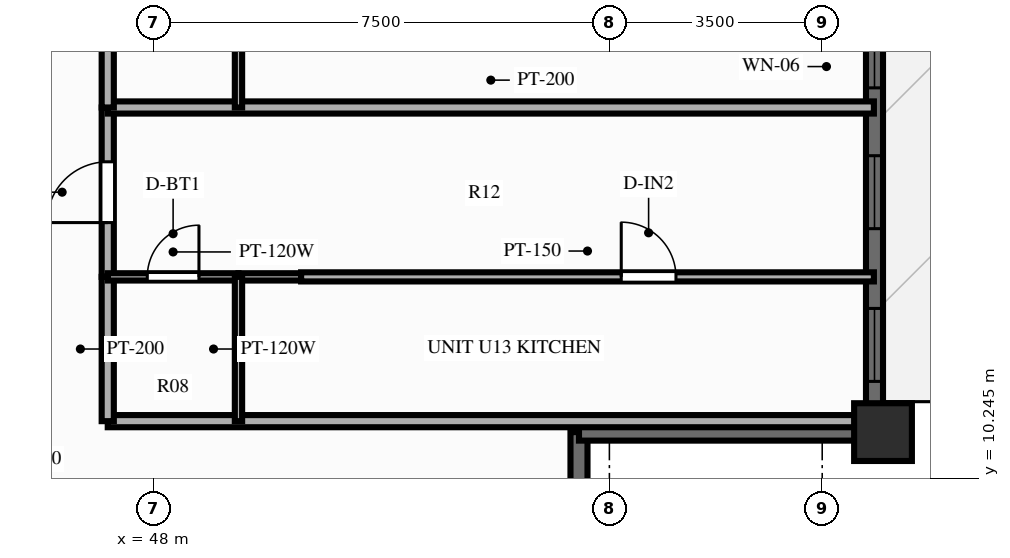
"""IFC4 building model, lengths in metres.
Left out: names, types, materials, properties, quantities, classifications, styles, units other than length and angle.
Written with IfcOpenShell. Run it as: python <this file> out.ifc"""

import sys

from ifc_helpers import new_model, si_unit, direction, frame, frame_2d, origin, origin_2d, place, context, subcontext, project, spatial, rectangle, extrude, source, transform, mapped, element, fill, save


model = new_model("IFC4")
c1 = context("Model", 3, precision=1e-05, world=origin(), true_north=direction((0.0, 1.0)))
c2 = subcontext(c1, "Body", "Model", "MODEL_VIEW")
j1 = project(units=[si_unit("LENGTHUNIT", "METRE"), si_unit("PLANEANGLEUNIT", "RADIAN")], contexts=[c1])
p1 = place(None, origin())
s1 = spatial("IfcSite", under=j1, at=p1, CompositionType="ELEMENT")
p2 = place(p1, origin())
s2 = spatial("IfcBuilding", under=s1, at=p2, CompositionType="ELEMENT")
p3 = place(p2, frame((0.0, 0.0, 169.0)))
s3 = spatial("IfcBuildingStorey", under=s2, at=p3, CompositionType="ELEMENT", Elevation=169.0)
m1 = source(origin(), c2, "Body", "SweptSolid", [
    extrude(rectangle(XDim=0.95, YDim=0.95, at=origin_2d()), origin(), (0.0, 0.0, 1.0), 3.9),
])
p4 = place(p3, frame((60.0, 11.0, 0.0), z_axis=(0.0, 0.0, 1.0), x_axis=(1.0, 0.0, 0.0)))
e1 = element("IfcColumn", 1, at=p4, inside=s3, PredefinedType="COLUMN", context=c2, shape_type="MappedRepresentation", body=[
    mapped(m1, transform((0.0, 0.0, 0.0), scale=1.0)),
])
p5 = place(p3, frame((59.86, 11.0, 0.0), z_axis=(0.0, 0.0, 1.0), x_axis=(0.0, 1.0, 0.0)))
e2 = element("IfcWall", 2, at=p5, inside=s3, PredefinedType="SOLIDWALL", context=c2, shape_type="SweptSolid", body=[
    extrude(rectangle(XDim=32.0, YDim=0.28, at=frame_2d((16.0, 0.0))), origin(), (0.0, 0.0, 1.0), 2.44),
])
p6 = place(p5, frame((0.834, 0.0, 0.25)))
e3 = element("IfcOpeningElement", 3, at=p6, cuts=e2, PredefinedType="OPENING", context=c2, shape_type="SweptSolid", body=[
    extrude(rectangle(XDim=1.2, YDim=1.5, at=frame_2d((0.6, 0.75))), frame((0.0, 0.152, 0.0), z_axis=(0.0, -1.0, 0.0), x_axis=(1.0, 0.0, 0.0)), (0.0, 0.0, 1.0), 0.304),
])
p7 = place(p5, frame((3.346, 0.0, 0.25)))
e4 = element("IfcOpeningElement", 4, at=p7, cuts=e2, PredefinedType="OPENING", context=c2, shape_type="SweptSolid", body=[
    extrude(rectangle(XDim=1.2, YDim=1.5, at=frame_2d((0.6, 0.75))), frame((0.0, 0.152, 0.0), z_axis=(0.0, -1.0, 0.0), x_axis=(1.0, 0.0, 0.0)), (0.0, 0.0, 1.0), 0.304),
])
p8 = place(p5, frame((5.662, 0.0, 0.25)))
e5 = element("IfcOpeningElement", 5, at=p8, cuts=e2, PredefinedType="OPENING", context=c2, shape_type="SweptSolid", body=[
    extrude(rectangle(XDim=0.7, YDim=1.5, at=frame_2d((0.35, 0.75))), frame((0.0, 0.152, 0.0), z_axis=(0.0, -1.0, 0.0), x_axis=(1.0, 0.0, 0.0)), (0.0, 0.0, 1.0), 0.304),
])
p9 = place(p5, frame((8.29, 0.0, 0.25)))
e6 = element("IfcOpeningElement", 6, at=p9, cuts=e2, PredefinedType="OPENING", context=c2, shape_type="SweptSolid", body=[
    extrude(rectangle(XDim=1.2, YDim=1.5, at=frame_2d((0.6, 0.75))), frame((0.0, 0.152, 0.0), z_axis=(0.0, -1.0, 0.0), x_axis=(1.0, 0.0, 0.0)), (0.0, 0.0, 1.0), 0.304),
])
p10 = place(p5, frame((10.688, 0.0, 0.25)))
e7 = element("IfcOpeningElement", 7, at=p10, cuts=e2, PredefinedType="OPENING", context=c2, shape_type="SweptSolid", body=[
    extrude(rectangle(XDim=1.2, YDim=1.5, at=frame_2d((0.6, 0.75))), frame((0.0, 0.152, 0.0), z_axis=(0.0, -1.0, 0.0), x_axis=(1.0, 0.0, 0.0)), (0.0, 0.0, 1.0), 0.304),
])
p11 = place(p5, frame((13.046, 0.0, 0.25)))
e8 = element("IfcOpeningElement", 8, at=p11, cuts=e2, PredefinedType="OPENING", context=c2, shape_type="SweptSolid", body=[
    extrude(rectangle(XDim=1.2, YDim=1.5, at=frame_2d((0.6, 0.75))), frame((0.0, 0.152, 0.0), z_axis=(0.0, -1.0, 0.0), x_axis=(1.0, 0.0, 0.0)), (0.0, 0.0, 1.0), 0.304),
])
p12 = place(p5, frame((15.4, 0.0, 0.25)))
e9 = element("IfcOpeningElement", 9, at=p12, cuts=e2, PredefinedType="OPENING", context=c2, shape_type="SweptSolid", body=[
    extrude(rectangle(XDim=1.2, YDim=1.5, at=frame_2d((0.6, 0.75))), frame((0.0, 0.152, 0.0), z_axis=(0.0, -1.0, 0.0), x_axis=(1.0, 0.0, 0.0)), (0.0, 0.0, 1.0), 0.304),
])
p13 = place(p5, frame((19.233, 0.0, 0.0), z_axis=(0.0, 0.0, 1.0), x_axis=(-1.0, 0.0, 0.0)))
e10 = element("IfcOpeningElement", 10, at=p13, cuts=e2, PredefinedType="OPENING", context=c2, shape_type="SweptSolid", body=[
    extrude(rectangle(XDim=1.6, YDim=2.15, at=frame_2d((0.8, 1.075))), frame((0.0, 0.152, 0.0), z_axis=(0.0, -1.0, 0.0), x_axis=(1.0, 0.0, 0.0)), (0.0, 0.0, 1.0), 0.304),
])
p14 = place(p5, frame((20.339, 0.0, 0.25)))
e11 = element("IfcOpeningElement", 11, at=p14, cuts=e2, PredefinedType="OPENING", context=c2, shape_type="SweptSolid", body=[
    extrude(rectangle(XDim=1.2, YDim=1.5, at=frame_2d((0.6, 0.75))), frame((0.0, 0.152, 0.0), z_axis=(0.0, -1.0, 0.0), x_axis=(1.0, 0.0, 0.0)), (0.0, 0.0, 1.0), 0.304),
])
p15 = place(p5, frame((22.788, 0.0, 0.25)))
e12 = element("IfcOpeningElement", 12, at=p15, cuts=e2, PredefinedType="OPENING", context=c2, shape_type="SweptSolid", body=[
    extrude(rectangle(XDim=1.2, YDim=1.5, at=frame_2d((0.6, 0.75))), frame((0.0, 0.152, 0.0), z_axis=(0.0, -1.0, 0.0), x_axis=(1.0, 0.0, 0.0)), (0.0, 0.0, 1.0), 0.304),
])
p16 = place(p5, frame((25.66, 0.0, 0.25)))
e13 = element("IfcOpeningElement", 13, at=p16, cuts=e2, PredefinedType="OPENING", context=c2, shape_type="SweptSolid", body=[
    extrude(rectangle(XDim=0.95, YDim=1.5, at=frame_2d((0.475, 0.75))), frame((0.0, 0.152, 0.0), z_axis=(0.0, -1.0, 0.0), x_axis=(1.0, 0.0, 0.0)), (0.0, 0.0, 1.0), 0.304),
])
p17 = place(p5, frame((27.669, 0.0, 0.25)))
e14 = element("IfcOpeningElement", 14, at=p17, cuts=e2, PredefinedType="OPENING", context=c2, shape_type="SweptSolid", body=[
    extrude(rectangle(XDim=1.2, YDim=1.5, at=frame_2d((0.6, 0.75))), frame((0.0, 0.152, 0.0), z_axis=(0.0, -1.0, 0.0), x_axis=(1.0, 0.0, 0.0)), (0.0, 0.0, 1.0), 0.304),
])
p18 = place(p5, frame((30.034, 0.0, 0.25)))
e15 = element("IfcOpeningElement", 15, at=p18, cuts=e2, PredefinedType="OPENING", context=c2, shape_type="SweptSolid", body=[
    extrude(rectangle(XDim=1.2, YDim=1.5, at=frame_2d((0.6, 0.75))), frame((0.0, 0.152, 0.0), z_axis=(0.0, -1.0, 0.0), x_axis=(1.0, 0.0, 0.0)), (0.0, 0.0, 1.0), 0.304),
])
for number, where, z_axis, x_axis in (
    (16, (55.0, 6.08, 0.0), (0.0, 0.0, 1.0), (0.0, 1.0, 0.0)),
    (17, (55.0, 11.0, 0.0), (0.0, 0.0, 1.0), (1.0, 0.0, 0.0)),
):
    element("IfcWall", number, at=place(p3, frame(where, z_axis=z_axis, x_axis=x_axis)), inside=s3, PredefinedType="SOLIDWALL", context=c2, shape_type="SweptSolid", body=[
        extrude(rectangle(XDim=4.92, YDim=0.28, at=frame_2d((2.46, 0.0))), origin(), (0.0, 0.0, 1.0), 2.44),
    ])
p19 = place(p3, frame((47.25, 11.18, 0.0), z_axis=(0.0, 0.0, 1.0), x_axis=(1.0, 0.0, 0.0)))
e18 = element("IfcWall", 18, at=p19, inside=s3, PredefinedType="PARTITIONING", context=c2, shape_type="SweptSolid", body=[
    extrude(rectangle(XDim=12.6, YDim=0.2, at=frame_2d((6.3, 0.0))), origin(), (0.0, 0.0, 1.0), 2.24),
])
p20 = place(p3, frame((47.25, 11.18, 0.0), z_axis=(0.0, 0.0, 1.0), x_axis=(0.0, 1.0, 0.0)))
e19 = element("IfcWall", 19, at=p20, inside=s3, PredefinedType="PARTITIONING", context=c2, shape_type="SweptSolid", body=[
    extrude(rectangle(XDim=2.373, YDim=0.2, at=frame_2d((1.187, 0.0))), origin(), (0.0, 0.0, 1.0), 3.56),
])
p21 = place(p3, frame((47.25, 13.553, 0.0), z_axis=(0.0, 0.0, 1.0), x_axis=(0.0, 1.0, 0.0)))
e20 = element("IfcWall", 20, at=p21, inside=s3, PredefinedType="PARTITIONING", context=c2, shape_type="SweptSolid", body=[
    extrude(rectangle(XDim=2.786, YDim=0.2, at=frame_2d((1.393, 0.0))), origin(), (0.0, 0.0, 1.0), 3.56),
])
p22 = place(p21, frame((0.893, 0.0, 0.0)))
e21 = element("IfcOpeningElement", 21, at=p22, cuts=e20, PredefinedType="OPENING", context=c2, shape_type="SweptSolid", body=[
    extrude(rectangle(XDim=1.0, YDim=2.15, at=frame_2d((0.5, 1.075))), frame((0.0, 0.112, 0.0), z_axis=(0.0, -1.0, 0.0), x_axis=(1.0, 0.0, 0.0)), (0.0, 0.0, 1.0), 0.224),
])
p23 = place(p3, frame((47.25, 13.553, 0.0), z_axis=(0.0, 0.0, 1.0), x_axis=(1.0, 0.0, 0.0)))
e22 = element("IfcWall", 22, at=p23, inside=s3, PredefinedType="PARTITIONING", context=c2, shape_type="SweptSolid", body=[
    extrude(rectangle(XDim=2.15, YDim=0.12, at=frame_2d((1.075, 0.0))), origin(), (0.0, 0.0, 1.0), 3.56),
])
p24 = place(p23, frame((0.65, 0.0, 0.0)))
e23 = element("IfcOpeningElement", 23, at=p24, cuts=e22, PredefinedType="OPENING", context=c2, shape_type="SweptSolid", body=[
    extrude(rectangle(XDim=0.85, YDim=2.05, at=frame_2d((0.425, 1.025))), frame((0.0, 0.072, 0.0), z_axis=(0.0, -1.0, 0.0), x_axis=(1.0, 0.0, 0.0)), (0.0, 0.0, 1.0), 0.144),
])
p25 = place(p3, frame((49.4, 13.553, 0.0), z_axis=(0.0, 0.0, 1.0), x_axis=(1.0, 0.0, 0.0)))
e24 = element("IfcWall", 24, at=p25, inside=s3, PredefinedType="PARTITIONING", context=c2, shape_type="SweptSolid", body=[
    extrude(rectangle(XDim=1.03, YDim=0.12, at=frame_2d((0.515, 0.0))), origin(), (0.0, 0.0, 1.0), 3.56),
])
p26 = place(p3, frame((49.4, 11.18, 0.0), z_axis=(0.0, 0.0, 1.0), x_axis=(0.0, 1.0, 0.0)))
e25 = element("IfcWall", 25, at=p26, inside=s3, PredefinedType="PARTITIONING", context=c2, shape_type="SweptSolid", body=[
    extrude(rectangle(XDim=2.373, YDim=0.12, at=frame_2d((1.187, 0.0))), origin(), (0.0, 0.0, 1.0), 3.56),
])
p27 = place(p3, frame((50.43, 13.553, 0.0), z_axis=(0.0, 0.0, 1.0), x_axis=(1.0, 0.0, 0.0)))
e26 = element("IfcWall", 26, at=p27, inside=s3, PredefinedType="PARTITIONING", context=c2, shape_type="SweptSolid", body=[
    extrude(rectangle(XDim=9.42, YDim=0.15, at=frame_2d((4.71, 0.0))), origin(), (0.0, 0.0, 1.0), 3.56),
])
p28 = place(p27, frame((5.265, 0.0, 0.0)))
e27 = element("IfcOpeningElement", 27, at=p28, cuts=e26, PredefinedType="OPENING", context=c2, shape_type="SweptSolid", body=[
    extrude(rectangle(XDim=0.9, YDim=2.1, at=frame_2d((0.45, 1.05))), frame((0.0, 0.087, 0.0), z_axis=(0.0, -1.0, 0.0), x_axis=(1.0, 0.0, 0.0)), (0.0, 0.0, 1.0), 0.174),
])
p29 = place(p3, frame((47.25, 16.339, 0.0), z_axis=(0.0, 0.0, 1.0), x_axis=(1.0, 0.0, 0.0)))
e28 = element("IfcWall", 28, at=p29, inside=s3, PredefinedType="PARTITIONING", context=c2, shape_type="SweptSolid", body=[
    extrude(rectangle(XDim=12.6, YDim=0.2, at=frame_2d((6.3, 0.0))), origin(), (0.0, 0.0, 1.0), 3.56),
])
p30 = place(p3, frame((47.25, 16.339, 0.0), z_axis=(0.0, 0.0, 1.0), x_axis=(0.0, 1.0, 0.0)))
e29 = element("IfcWall", 29, at=p30, inside=s3, PredefinedType="PARTITIONING", context=c2, shape_type="SweptSolid", body=[
    extrude(rectangle(XDim=2.237, YDim=0.2, at=frame_2d((1.119, 0.0))), origin(), (0.0, 0.0, 1.0), 3.56),
])
p31 = place(p3, frame((49.4, 16.339, 0.0), z_axis=(0.0, 0.0, 1.0), x_axis=(0.0, 1.0, 0.0)))
e30 = element("IfcWall", 30, at=p31, inside=s3, PredefinedType="PARTITIONING", context=c2, shape_type="SweptSolid", body=[
    extrude(rectangle(XDim=2.237, YDim=0.12, at=frame_2d((1.119, 0.0))), origin(), (0.0, 0.0, 1.0), 3.56),
])
m2 = source(origin(), c2, "Body", "SweptSolid", [
    extrude(rectangle(XDim=1.2, YDim=1.5, at=frame_2d((0.6, 0.75))), frame((0.0, 0.03, 0.0), z_axis=(0.0, -1.0, 0.0), x_axis=(1.0, 0.0, 0.0)), (0.0, 0.0, 1.0), 0.06),
])
p32 = place(p6, origin())
e31 = element("IfcWindow", 31, at=p32, inside=s3, PartitioningType="SINGLE_PANEL", PredefinedType="WINDOW", context=c2, shape_type="MappedRepresentation", body=[
    mapped(m2, transform((0.0, 0.0, 0.0), scale=1.0)),
])
fill(e3, e31)
p33 = place(p7, origin())
e32 = element("IfcWindow", 32, at=p33, inside=s3, PartitioningType="SINGLE_PANEL", PredefinedType="WINDOW", context=c2, shape_type="MappedRepresentation", body=[
    mapped(m2, transform((0.0, 0.0, 0.0), scale=1.0)),
])
fill(e4, e32)
m3 = source(origin(), c2, "Body", "SweptSolid", [
    extrude(rectangle(XDim=0.7, YDim=1.5, at=frame_2d((0.35, 0.75))), frame((0.0, 0.03, 0.0), z_axis=(0.0, -1.0, 0.0), x_axis=(1.0, 0.0, 0.0)), (0.0, 0.0, 1.0), 0.06),
])
p34 = place(p8, origin())
e33 = element("IfcWindow", 33, at=p34, inside=s3, PartitioningType="SINGLE_PANEL", PredefinedType="WINDOW", context=c2, shape_type="MappedRepresentation", body=[
    mapped(m3, transform((0.0, 0.0, 0.0), scale=1.0)),
])
fill(e5, e33)
m4 = source(origin(), c2, "Body", "SweptSolid", [
    extrude(rectangle(XDim=1.0, YDim=2.15, at=frame_2d((0.5, 1.075))), frame((0.0, 0.025, 0.0), z_axis=(0.0, -1.0, 0.0), x_axis=(1.0, 0.0, 0.0)), (0.0, 0.0, 1.0), 0.05),
])
p35 = place(p22, origin())
e34 = element("IfcDoor", 34, at=p35, inside=s3, OperationType="SINGLE_SWING_LEFT", PredefinedType="DOOR", context=c2, shape_type="MappedRepresentation", body=[
    mapped(m4, transform((0.0, 0.0, 0.0), scale=1.0)),
])
fill(e21, e34)
m5 = source(origin(), c2, "Body", "SweptSolid", [
    extrude(rectangle(XDim=0.85, YDim=2.05, at=frame_2d((0.425, 1.025))), frame((0.0, 0.025, 0.0), z_axis=(0.0, -1.0, 0.0), x_axis=(1.0, 0.0, 0.0)), (0.0, 0.0, 1.0), 0.05),
])
p36 = place(p24, origin())
e35 = element("IfcDoor", 35, at=p36, inside=s3, OperationType="SINGLE_SWING_RIGHT", PredefinedType="DOOR", context=c2, shape_type="MappedRepresentation", body=[
    mapped(m5, transform((0.0, 0.0, 0.0), scale=1.0)),
])
fill(e23, e35)
m6 = source(origin(), c2, "Body", "SweptSolid", [
    extrude(rectangle(XDim=0.9, YDim=2.1, at=frame_2d((0.45, 1.05))), frame((0.0, 0.025, 0.0), z_axis=(0.0, -1.0, 0.0), x_axis=(1.0, 0.0, 0.0)), (0.0, 0.0, 1.0), 0.05),
])
p37 = place(p28, origin())
e36 = element("IfcDoor", 36, at=p37, inside=s3, OperationType="SINGLE_SWING_LEFT", PredefinedType="DOOR", context=c2, shape_type="MappedRepresentation", body=[
    mapped(m6, transform((0.0, 0.0, 0.0), scale=1.0)),
])
fill(e27, e36)
save(model, sys.argv[1])
